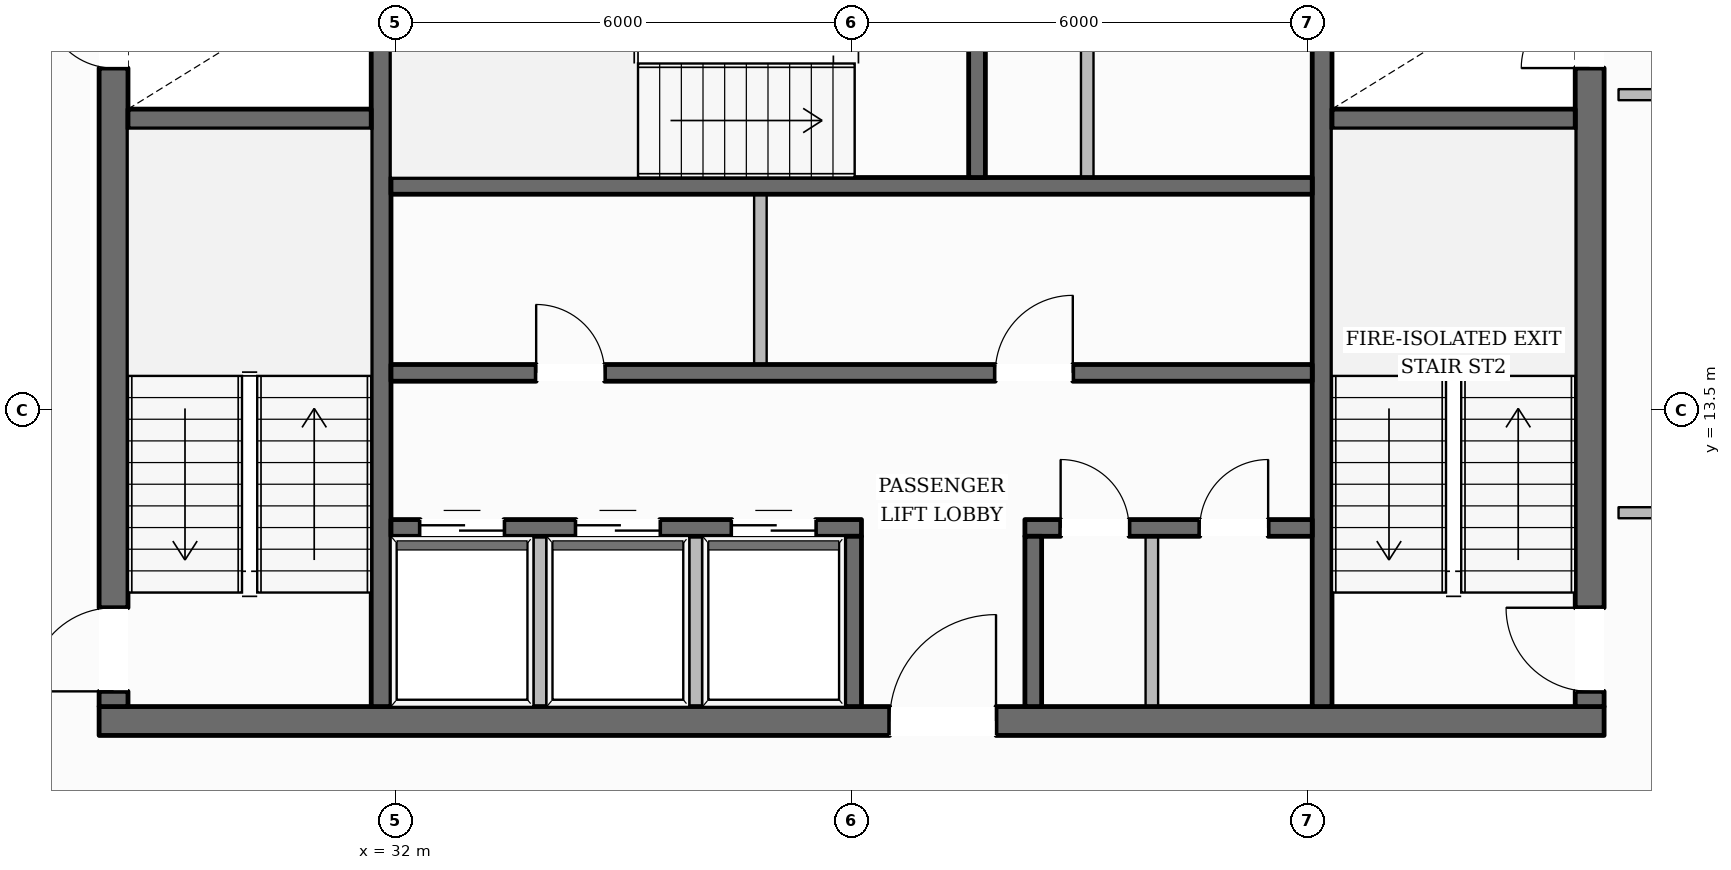
"""IFC4 building model, lengths in metres.
Left out: names, types, materials, properties, quantities, classifications, styles, units other than length and angle.
Written with IfcOpenShell. Run it as: python <this file> out.ifc"""

import sys

from ifc_helpers import new_model, si_unit, direction, frame, frame_2d, origin, place, context, subcontext, project, spatial, rectangle, extrude, element, fill, save


model = new_model("IFC4")
c1 = context("Model", 3, precision=1e-05, world=origin(), true_north=direction((0.0, 1.0)))
c2 = subcontext(c1, "Body", "Model", "MODEL_VIEW")
j1 = project(units=[si_unit("LENGTHUNIT", "METRE"), si_unit("PLANEANGLEUNIT", "RADIAN")], contexts=[c1])
p1 = place(None, origin())
s1 = spatial("IfcSite", under=j1, at=p1, CompositionType="ELEMENT")
p2 = place(p1, origin())
s2 = spatial("IfcBuilding", under=s1, at=p2, CompositionType="ELEMENT")
p3 = place(p2, frame((0.0, 0.0, 297.25)))
s3 = spatial("IfcBuildingStorey", under=s2, at=p3, CompositionType="ELEMENT", Elevation=297.25)
p4 = place(p3, frame((28.1, 9.41, 0.0), z_axis=(0.0, 0.0, 1.0), x_axis=(1.0, 0.0, 0.0)))
e1 = element("IfcWall", 1, at=p4, inside=s3, PredefinedType="SOLIDWALL", context=c2, shape_type="SweptSolid", body=[
    extrude(rectangle(XDim=19.8, YDim=0.38, at=frame_2d((9.9, 0.0))), origin(), (0.0, 0.0, 1.0), 3.61),
])
p5 = place(p4, frame((10.4, 0.0, 0.0)))
e2 = element("IfcOpeningElement", 2, at=p5, cuts=e1, PredefinedType="OPENING", context=c2, shape_type="SweptSolid", body=[
    extrude(rectangle(XDim=1.4, YDim=2.2, at=frame_2d((0.7, 1.1))), frame((0.0, 0.2, 0.0), z_axis=(0.0, -1.0, 0.0), x_axis=(1.0, 0.0, 0.0)), (0.0, 0.0, 1.0), 0.4),
])
p6 = place(p3, frame((28.29, 9.6, 0.0), z_axis=(0.0, 0.0, 1.0), x_axis=(0.0, 1.0, 0.0)))
e3 = element("IfcWall", 3, at=p6, inside=s3, PredefinedType="SOLIDWALL", context=c2, shape_type="SweptSolid", body=[
    extrude(rectangle(XDim=13.0, YDim=0.38, at=frame_2d((6.5, 0.0))), origin(), (0.0, 0.0, 1.0), 3.61),
])
p7 = place(p6, frame((0.2, 0.0, 0.0)))
e4 = element("IfcOpeningElement", 4, at=p7, cuts=e3, PredefinedType="OPENING", context=c2, shape_type="SweptSolid", body=[
    extrude(rectangle(XDim=1.1, YDim=2.15, at=frame_2d((0.55, 1.075))), frame((0.0, 0.2, 0.0), z_axis=(0.0, -1.0, 0.0), x_axis=(1.0, 0.0, 0.0)), (0.0, 0.0, 1.0), 0.4),
])
p8 = place(p6, frame((8.4, 0.0, 0.0)))
e5 = element("IfcOpeningElement", 5, at=p8, cuts=e3, PredefinedType="OPENING", context=c2, shape_type="SweptSolid", body=[
    extrude(rectangle(XDim=0.9, YDim=2.1, at=frame_2d((0.45, 1.05))), frame((0.0, 0.2, 0.0), z_axis=(0.0, -1.0, 0.0), x_axis=(1.0, 0.0, 0.0)), (0.0, 0.0, 1.0), 0.4),
])
p9 = place(p3, frame((47.71, 9.6, 0.0), z_axis=(0.0, 0.0, 1.0), x_axis=(0.0, 1.0, 0.0)))
e6 = element("IfcWall", 6, at=p9, inside=s3, PredefinedType="SOLIDWALL", context=c2, shape_type="SweptSolid", body=[
    extrude(rectangle(XDim=13.0, YDim=0.38, at=frame_2d((6.5, 0.0))), origin(), (0.0, 0.0, 1.0), 3.61),
])
p10 = place(p9, frame((0.2, 0.0, 0.0)))
e7 = element("IfcOpeningElement", 7, at=p10, cuts=e6, PredefinedType="OPENING", context=c2, shape_type="SweptSolid", body=[
    extrude(rectangle(XDim=1.1, YDim=2.15, at=frame_2d((0.55, 1.075))), frame((0.0, 0.2, 0.0), z_axis=(0.0, -1.0, 0.0), x_axis=(1.0, 0.0, 0.0)), (0.0, 0.0, 1.0), 0.4),
])
p11 = place(p9, frame((8.4, 0.0, 0.0)))
e8 = element("IfcOpeningElement", 8, at=p11, cuts=e6, PredefinedType="OPENING", context=c2, shape_type="SweptSolid", body=[
    extrude(rectangle(XDim=0.9, YDim=2.1, at=frame_2d((0.45, 1.05))), frame((0.0, 0.2, 0.0), z_axis=(0.0, -1.0, 0.0), x_axis=(1.0, 0.0, 0.0)), (0.0, 0.0, 1.0), 0.4),
])
p12 = place(p3, frame((31.81, 9.6, 0.0), z_axis=(0.0, 0.0, 1.0), x_axis=(0.0, 1.0, 0.0)))
e9 = element("IfcWall", 9, at=p12, inside=s3, PredefinedType="SHEAR", context=c2, shape_type="SweptSolid", body=[
    extrude(rectangle(XDim=13.0, YDim=0.26, at=frame_2d((6.5, 0.0))), origin(), (0.0, 0.0, 1.0), 3.61),
])
p13 = place(p12, frame((10.925, 0.0, 0.0)))
e10 = element("IfcOpeningElement", 10, at=p13, cuts=e9, PredefinedType="OPENING", context=c2, shape_type="SweptSolid", body=[
    extrude(rectangle(XDim=1.25, YDim=2.25, at=frame_2d((0.625, 1.125))), frame((0.0, 0.14, 0.0), z_axis=(0.0, -1.0, 0.0), x_axis=(1.0, 0.0, 0.0)), (0.0, 0.0, 1.0), 0.28),
])
p14 = place(p3, frame((44.19, 9.6, 0.0), z_axis=(0.0, 0.0, 1.0), x_axis=(0.0, 1.0, 0.0)))
e11 = element("IfcWall", 11, at=p14, inside=s3, PredefinedType="SHEAR", context=c2, shape_type="SweptSolid", body=[
    extrude(rectangle(XDim=13.0, YDim=0.26, at=frame_2d((6.5, 0.0))), origin(), (0.0, 0.0, 1.0), 3.61),
])
p15 = place(p14, frame((10.925, 0.0, 0.0)))
e12 = element("IfcOpeningElement", 12, at=p15, cuts=e11, PredefinedType="OPENING", context=c2, shape_type="SweptSolid", body=[
    extrude(rectangle(XDim=1.25, YDim=2.25, at=frame_2d((0.625, 1.125))), frame((0.0, 0.14, 0.0), z_axis=(0.0, -1.0, 0.0), x_axis=(1.0, 0.0, 0.0)), (0.0, 0.0, 1.0), 0.28),
])
for number, where, z_axis, x_axis in (
    (13, (28.48, 17.33, 0.0), (0.0, 0.0, 1.0), (1.0, 0.0, 0.0)),
    (14, (44.32, 17.33, 0.0), (0.0, 0.0, 1.0), (1.0, 0.0, 0.0)),
):
    element("IfcWall", number, at=place(p3, frame(where, z_axis=z_axis, x_axis=x_axis)), inside=s3, PredefinedType="SHEAR", context=c2, shape_type="SweptSolid", body=[
        extrude(rectangle(XDim=3.2, YDim=0.26, at=frame_2d((1.6, 0.0))), origin(), (0.0, 0.0, 1.0), 3.61),
    ])
p16 = place(p3, frame((31.94, 16.45, 0.0), z_axis=(0.0, 0.0, 1.0), x_axis=(1.0, 0.0, 0.0)))
e15 = element("IfcWall", 15, at=p16, inside=s3, PredefinedType="SOLIDWALL", context=c2, shape_type="SweptSolid", body=[
    extrude(rectangle(XDim=12.12, YDim=0.22, at=frame_2d((6.06, 0.0))), origin(), (0.0, 0.0, 1.0), 3.61),
])
p17 = place(p3, frame((39.65, 16.56, 0.0), z_axis=(0.0, 0.0, 1.0), x_axis=(0.0, 1.0, 0.0)))
e16 = element("IfcWall", 16, at=p17, inside=s3, PredefinedType="SOLIDWALL", context=c2, shape_type="SweptSolid", body=[
    extrude(rectangle(XDim=3.2, YDim=0.22, at=frame_2d((1.6, 0.0))), origin(), (0.0, 0.0, 1.0), 3.61),
])
p18 = place(p3, frame((31.94, 13.99, 0.0), z_axis=(0.0, 0.0, 1.0), x_axis=(1.0, 0.0, 0.0)))
e17 = element("IfcWall", 17, at=p18, inside=s3, PredefinedType="SOLIDWALL", context=c2, shape_type="SweptSolid", body=[
    extrude(rectangle(XDim=12.12, YDim=0.22, at=frame_2d((6.06, 0.0))), origin(), (0.0, 0.0, 1.0), 3.61),
])
p19 = place(p18, frame((1.91, 0.0, 0.0)))
e18 = element("IfcOpeningElement", 18, at=p19, cuts=e17, PredefinedType="OPENING", context=c2, shape_type="SweptSolid", body=[
    extrude(rectangle(XDim=0.9, YDim=2.1, at=frame_2d((0.45, 1.05))), frame((0.0, 0.12, 0.0), z_axis=(0.0, -1.0, 0.0), x_axis=(1.0, 0.0, 0.0)), (0.0, 0.0, 1.0), 0.24),
])
p20 = place(p18, frame((7.95, 0.0, 0.0)))
e19 = element("IfcOpeningElement", 19, at=p20, cuts=e17, PredefinedType="OPENING", context=c2, shape_type="SweptSolid", body=[
    extrude(rectangle(XDim=1.02, YDim=2.15, at=frame_2d((0.51, 1.075))), frame((0.0, 0.12, 0.0), z_axis=(0.0, -1.0, 0.0), x_axis=(1.0, 0.0, 0.0)), (0.0, 0.0, 1.0), 0.24),
])
p21 = place(p3, frame((31.94, 11.95, 0.0), z_axis=(0.0, 0.0, 1.0), x_axis=(1.0, 0.0, 0.0)))
e20 = element("IfcWall", 20, at=p21, inside=s3, PredefinedType="SOLIDWALL", context=c2, shape_type="SweptSolid", body=[
    extrude(rectangle(XDim=6.19, YDim=0.22, at=frame_2d((3.095, 0.0))), origin(), (0.0, 0.0, 1.0), 3.61),
])
p22 = place(p21, frame((0.385, 0.0, 0.0)))
e21 = element("IfcOpeningElement", 21, at=p22, cuts=e20, PredefinedType="OPENING", context=c2, shape_type="SweptSolid", body=[
    extrude(rectangle(XDim=1.1, YDim=2.2, at=frame_2d((0.55, 1.1))), frame((0.0, 0.12, 0.0), z_axis=(0.0, -1.0, 0.0), x_axis=(1.0, 0.0, 0.0)), (0.0, 0.0, 1.0), 0.24),
])
p23 = place(p21, frame((2.435, 0.0, 0.0)))
e22 = element("IfcOpeningElement", 22, at=p23, cuts=e20, PredefinedType="OPENING", context=c2, shape_type="SweptSolid", body=[
    extrude(rectangle(XDim=1.1, YDim=2.2, at=frame_2d((0.55, 1.1))), frame((0.0, 0.12, 0.0), z_axis=(0.0, -1.0, 0.0), x_axis=(1.0, 0.0, 0.0)), (0.0, 0.0, 1.0), 0.24),
])
p24 = place(p21, frame((4.485, 0.0, 0.0)))
e23 = element("IfcOpeningElement", 23, at=p24, cuts=e20, PredefinedType="OPENING", context=c2, shape_type="SweptSolid", body=[
    extrude(rectangle(XDim=1.1, YDim=2.2, at=frame_2d((0.55, 1.1))), frame((0.0, 0.12, 0.0), z_axis=(0.0, -1.0, 0.0), x_axis=(1.0, 0.0, 0.0)), (0.0, 0.0, 1.0), 0.24),
])
p25 = place(p3, frame((40.28, 11.95, 0.0), z_axis=(0.0, 0.0, 1.0), x_axis=(1.0, 0.0, 0.0)))
e24 = element("IfcWall", 24, at=p25, inside=s3, PredefinedType="SOLIDWALL", context=c2, shape_type="SweptSolid", body=[
    extrude(rectangle(XDim=3.78, YDim=0.22, at=frame_2d((1.89, 0.0))), origin(), (0.0, 0.0, 1.0), 3.61),
])
p26 = place(p25, frame((0.47, 0.0, 0.0)))
e25 = element("IfcOpeningElement", 25, at=p26, cuts=e24, PredefinedType="OPENING", context=c2, shape_type="SweptSolid", body=[
    extrude(rectangle(XDim=0.9, YDim=2.1, at=frame_2d((0.45, 1.05))), frame((0.0, 0.12, 0.0), z_axis=(0.0, -1.0, 0.0), x_axis=(1.0, 0.0, 0.0)), (0.0, 0.0, 1.0), 0.24),
])
p27 = place(p25, frame((2.3, 0.0, 0.0)))
e26 = element("IfcOpeningElement", 26, at=p27, cuts=e24, PredefinedType="OPENING", context=c2, shape_type="SweptSolid", body=[
    extrude(rectangle(XDim=0.9, YDim=2.1, at=frame_2d((0.45, 1.05))), frame((0.0, 0.12, 0.0), z_axis=(0.0, -1.0, 0.0), x_axis=(1.0, 0.0, 0.0)), (0.0, 0.0, 1.0), 0.24),
])
for number, where, z_axis, x_axis in (
    (27, (38.02, 9.6, 0.0), (0.0, 0.0, 1.0), (0.0, 1.0, 0.0)),
    (28, (40.39, 9.6, 0.0), (0.0, 0.0, 1.0), (0.0, 1.0, 0.0)),
):
    element("IfcWall", number, at=place(p3, frame(where, z_axis=z_axis, x_axis=x_axis)), inside=s3, PredefinedType="SOLIDWALL", context=c2, shape_type="SweptSolid", body=[
        extrude(rectangle(XDim=2.24, YDim=0.22, at=frame_2d((1.12, 0.0))), origin(), (0.0, 0.0, 1.0), 3.61),
    ])
p28 = place(p3, frame((15.563, 10.112, 0.0), z_axis=(0.0, 0.0, 1.0), x_axis=(0.4973006053, 0.867578300771, 0.0)))
e29 = element("IfcWall", 29, at=p28, inside=s3, PredefinedType="STANDARD", context=c2, shape_type="SweptSolid", body=[
    extrude(rectangle(XDim=39.842, YDim=0.35, at=frame_2d((19.921, 0.0))), origin(), (0.0, 0.0, 1.0), 3.196),
])
p29 = place(p28, frame((35.45, 0.0, 0.65)))
e30 = element("IfcOpeningElement", 30, at=p29, cuts=e29, PredefinedType="OPENING", context=c2, shape_type="SweptSolid", body=[
    extrude(rectangle(XDim=1.35, YDim=1.75, at=frame_2d((0.675, 0.875))), frame((0.0, 0.185, 0.0), z_axis=(0.0, -1.0, 0.0), x_axis=(1.0, 0.0, 0.0)), (0.0, 0.0, 1.0), 0.37),
])
p30 = place(p28, frame((28.968, 0.0, 0.65)))
e31 = element("IfcOpeningElement", 31, at=p30, cuts=e29, PredefinedType="OPENING", context=c2, shape_type="SweptSolid", body=[
    extrude(rectangle(XDim=1.35, YDim=1.75, at=frame_2d((0.675, 0.875))), frame((0.0, 0.185, 0.0), z_axis=(0.0, -1.0, 0.0), x_axis=(1.0, 0.0, 0.0)), (0.0, 0.0, 1.0), 0.37),
])
p31 = place(p28, frame((16.003, 0.0, 0.65)))
e32 = element("IfcOpeningElement", 32, at=p31, cuts=e29, PredefinedType="OPENING", context=c2, shape_type="SweptSolid", body=[
    extrude(rectangle(XDim=1.35, YDim=1.75, at=frame_2d((0.675, 0.875))), frame((0.0, 0.185, 0.0), z_axis=(0.0, -1.0, 0.0), x_axis=(1.0, 0.0, 0.0)), (0.0, 0.0, 1.0), 0.37),
])
p32 = place(p28, frame((9.521, 0.0, 0.65)))
e33 = element("IfcOpeningElement", 33, at=p32, cuts=e29, PredefinedType="OPENING", context=c2, shape_type="SweptSolid", body=[
    extrude(rectangle(XDim=1.35, YDim=1.75, at=frame_2d((0.675, 0.875))), frame((0.0, 0.185, 0.0), z_axis=(0.0, -1.0, 0.0), x_axis=(1.0, 0.0, 0.0)), (0.0, 0.0, 1.0), 0.37),
])
p33 = place(p28, frame((3.039, 0.0, 0.65)))
e34 = element("IfcOpeningElement", 34, at=p33, cuts=e29, PredefinedType="OPENING", context=c2, shape_type="SweptSolid", body=[
    extrude(rectangle(XDim=1.35, YDim=1.75, at=frame_2d((0.675, 0.875))), frame((0.0, 0.185, 0.0), z_axis=(0.0, -1.0, 0.0), x_axis=(1.0, 0.0, 0.0)), (0.0, 0.0, 1.0), 0.37),
])
p34 = place(p3, frame((40.538, 44.729, 0.0), z_axis=(0.0, 0.0, 1.0), x_axis=(0.48974037202, -0.871868320341, 0.0)))
e35 = element("IfcWall", 35, at=p34, inside=s3, PredefinedType="STANDARD", context=c2, shape_type="SweptSolid", body=[
    extrude(rectangle(XDim=39.262, YDim=0.35, at=frame_2d((19.631, 0.0))), origin(), (0.0, 0.0, 1.0), 3.196),
])
p35 = place(p34, frame((34.923, 0.0, 0.65)))
e36 = element("IfcOpeningElement", 36, at=p35, cuts=e35, PredefinedType="OPENING", context=c2, shape_type="SweptSolid", body=[
    extrude(rectangle(XDim=1.35, YDim=1.75, at=frame_2d((0.675, 0.875))), frame((0.0, 0.185, 0.0), z_axis=(0.0, -1.0, 0.0), x_axis=(1.0, 0.0, 0.0)), (0.0, 0.0, 1.0), 0.37),
])
p36 = place(p34, frame((28.538, 0.0, 0.65)))
e37 = element("IfcOpeningElement", 37, at=p36, cuts=e35, PredefinedType="OPENING", context=c2, shape_type="SweptSolid", body=[
    extrude(rectangle(XDim=1.35, YDim=1.75, at=frame_2d((0.675, 0.875))), frame((0.0, 0.185, 0.0), z_axis=(0.0, -1.0, 0.0), x_axis=(1.0, 0.0, 0.0)), (0.0, 0.0, 1.0), 0.37),
])
p37 = place(p34, frame((15.77, 0.0, 0.65)))
e38 = element("IfcOpeningElement", 38, at=p37, cuts=e35, PredefinedType="OPENING", context=c2, shape_type="SweptSolid", body=[
    extrude(rectangle(XDim=1.35, YDim=1.75, at=frame_2d((0.675, 0.875))), frame((0.0, 0.185, 0.0), z_axis=(0.0, -1.0, 0.0), x_axis=(1.0, 0.0, 0.0)), (0.0, 0.0, 1.0), 0.37),
])
p38 = place(p34, frame((9.385, 0.0, 0.65)))
e39 = element("IfcOpeningElement", 39, at=p38, cuts=e35, PredefinedType="OPENING", context=c2, shape_type="SweptSolid", body=[
    extrude(rectangle(XDim=1.35, YDim=1.75, at=frame_2d((0.675, 0.875))), frame((0.0, 0.185, 0.0), z_axis=(0.0, -1.0, 0.0), x_axis=(1.0, 0.0, 0.0)), (0.0, 0.0, 1.0), 0.37),
])
p39 = place(p34, frame((3.001, 0.0, 0.65)))
e40 = element("IfcOpeningElement", 40, at=p39, cuts=e35, PredefinedType="OPENING", context=c2, shape_type="SweptSolid", body=[
    extrude(rectangle(XDim=1.35, YDim=1.75, at=frame_2d((0.675, 0.875))), frame((0.0, 0.185, 0.0), z_axis=(0.0, -1.0, 0.0), x_axis=(1.0, 0.0, 0.0)), (0.0, 0.0, 1.0), 0.37),
])
for number, where, z_axis, x_axis in (
    (41, (33.9, 9.49, 0.0), (0.0, 0.0, 1.0), (0.0, 1.0, 0.0)),
    (42, (35.95, 9.49, 0.0), (0.0, 0.0, 1.0), (0.0, 1.0, 0.0)),
):
    element("IfcWall", number, at=place(p3, frame(where, z_axis=z_axis, x_axis=x_axis)), inside=s3, PredefinedType="PARTITIONING", context=c2, shape_type="SweptSolid", body=[
        extrude(rectangle(XDim=2.35, YDim=0.165, at=frame_2d((1.175, 0.0))), origin(), (0.0, 0.0, 1.0), 3.61),
    ])
p40 = place(p3, frame((36.8, 14.1, 0.0), z_axis=(0.0, 0.0, 1.0), x_axis=(0.0, 1.0, 0.0)))
e43 = element("IfcWall", 43, at=p40, inside=s3, PredefinedType="PARTITIONING", context=c2, shape_type="SweptSolid", body=[
    extrude(rectangle(XDim=2.24, YDim=0.165, at=frame_2d((1.12, 0.0))), origin(), (0.0, 0.0, 1.0), 3.61),
])
p41 = place(p3, frame((41.1, 16.56, 0.0), z_axis=(0.0, 0.0, 1.0), x_axis=(0.0, 1.0, 0.0)))
e44 = element("IfcWall", 44, at=p41, inside=s3, PredefinedType="PARTITIONING", context=c2, shape_type="SweptSolid", body=[
    extrude(rectangle(XDim=3.2, YDim=0.165, at=frame_2d((1.6, 0.0))), origin(), (0.0, 0.0, 1.0), 3.61),
])
p42 = place(p3, frame((41.95, 9.49, 0.0), z_axis=(0.0, 0.0, 1.0), x_axis=(0.0, 1.0, 0.0)))
e45 = element("IfcWall", 45, at=p42, inside=s3, PredefinedType="PARTITIONING", context=c2, shape_type="SweptSolid", body=[
    extrude(rectangle(XDim=2.35, YDim=0.165, at=frame_2d((1.175, 0.0))), origin(), (0.0, 0.0, 1.0), 3.61),
])
for number, where, z_axis, x_axis in (
    (46, (49.91, 17.65, 0.0), (0.0, 0.0, 1.0), (-1.0, 0.0, 0.0)),
    (47, (48.09, 12.15, 0.0), (0.0, 0.0, 1.0), (1.0, 0.0, 0.0)),
):
    element("IfcWall", number, at=place(p3, frame(where, z_axis=z_axis, x_axis=x_axis)), inside=s3, PredefinedType="PARTITIONING", context=c2, shape_type="SweptSolid", body=[
        extrude(rectangle(XDim=1.82, YDim=0.145, at=frame_2d((0.91, 0.0))), origin(), (0.0, 0.0, 1.0), 3.61),
    ])
p43 = place(p7, origin())
e48 = element("IfcDoor", 48, at=p43, inside=s3, OperationType="SINGLE_SWING_LEFT", PredefinedType="DOOR", context=c2, shape_type="SweptSolid", body=[
    extrude(rectangle(XDim=1.1, YDim=2.15, at=frame_2d((0.55, 1.075))), frame((0.0, 0.025, 0.0), z_axis=(0.0, -1.0, 0.0), x_axis=(1.0, 0.0, 0.0)), (0.0, 0.0, 1.0), 0.05),
])
fill(e4, e48)
p44 = place(p10, origin())
e49 = element("IfcDoor", 49, at=p44, inside=s3, OperationType="SINGLE_SWING_RIGHT", PredefinedType="DOOR", context=c2, shape_type="SweptSolid", body=[
    extrude(rectangle(XDim=1.1, YDim=2.15, at=frame_2d((0.55, 1.075))), frame((0.0, 0.025, 0.0), z_axis=(0.0, -1.0, 0.0), x_axis=(1.0, 0.0, 0.0)), (0.0, 0.0, 1.0), 0.05),
])
fill(e7, e49)
p45 = place(p8, origin())
e50 = element("IfcDoor", 50, at=p45, inside=s3, OperationType="SINGLE_SWING_RIGHT", PredefinedType="DOOR", context=c2, shape_type="SweptSolid", body=[
    extrude(rectangle(XDim=0.9, YDim=2.1, at=frame_2d((0.45, 1.05))), frame((0.0, 0.025, 0.0), z_axis=(0.0, -1.0, 0.0), x_axis=(1.0, 0.0, 0.0)), (0.0, 0.0, 1.0), 0.05),
])
fill(e5, e50)
p46 = place(p11, origin())
e51 = element("IfcDoor", 51, at=p46, inside=s3, OperationType="SINGLE_SWING_LEFT", PredefinedType="DOOR", context=c2, shape_type="SweptSolid", body=[
    extrude(rectangle(XDim=0.9, YDim=2.1, at=frame_2d((0.45, 1.05))), frame((0.0, 0.025, 0.0), z_axis=(0.0, -1.0, 0.0), x_axis=(1.0, 0.0, 0.0)), (0.0, 0.0, 1.0), 0.05),
])
fill(e8, e51)
p47 = place(p5, origin())
e52 = element("IfcDoor", 52, at=p47, inside=s3, OperationType="SINGLE_SWING_RIGHT", PredefinedType="DOOR", context=c2, shape_type="SweptSolid", body=[
    extrude(rectangle(XDim=1.4, YDim=2.2, at=frame_2d((0.7, 1.1))), frame((0.0, 0.025, 0.0), z_axis=(0.0, -1.0, 0.0), x_axis=(1.0, 0.0, 0.0)), (0.0, 0.0, 1.0), 0.05),
])
fill(e2, e52)
p48 = place(p22, origin())
e53 = element("IfcDoor", 53, at=p48, inside=s3, OperationType="DOUBLE_DOOR_SLIDING", PredefinedType="DOOR", context=c2, shape_type="SweptSolid", body=[
    extrude(rectangle(XDim=1.1, YDim=2.2, at=frame_2d((0.55, 1.1))), frame((0.0, 0.025, 0.0), z_axis=(0.0, -1.0, 0.0), x_axis=(1.0, 0.0, 0.0)), (0.0, 0.0, 1.0), 0.05),
])
fill(e21, e53)
p49 = place(p23, origin())
e54 = element("IfcDoor", 54, at=p49, inside=s3, OperationType="DOUBLE_DOOR_SLIDING", PredefinedType="DOOR", context=c2, shape_type="SweptSolid", body=[
    extrude(rectangle(XDim=1.1, YDim=2.2, at=frame_2d((0.55, 1.1))), frame((0.0, 0.025, 0.0), z_axis=(0.0, -1.0, 0.0), x_axis=(1.0, 0.0, 0.0)), (0.0, 0.0, 1.0), 0.05),
])
fill(e22, e54)
p50 = place(p24, origin())
e55 = element("IfcDoor", 55, at=p50, inside=s3, OperationType="DOUBLE_DOOR_SLIDING", PredefinedType="DOOR", context=c2, shape_type="SweptSolid", body=[
    extrude(rectangle(XDim=1.1, YDim=2.2, at=frame_2d((0.55, 1.1))), frame((0.0, 0.025, 0.0), z_axis=(0.0, -1.0, 0.0), x_axis=(1.0, 0.0, 0.0)), (0.0, 0.0, 1.0), 0.05),
])
fill(e23, e55)
p51 = place(p19, origin())
e56 = element("IfcDoor", 56, at=p51, inside=s3, OperationType="SINGLE_SWING_LEFT", PredefinedType="DOOR", context=c2, shape_type="SweptSolid", body=[
    extrude(rectangle(XDim=0.9, YDim=2.1, at=frame_2d((0.45, 1.05))), frame((0.0, 0.025, 0.0), z_axis=(0.0, -1.0, 0.0), x_axis=(1.0, 0.0, 0.0)), (0.0, 0.0, 1.0), 0.05),
])
fill(e18, e56)
p52 = place(p20, origin())
e57 = element("IfcDoor", 57, at=p52, inside=s3, OperationType="SINGLE_SWING_RIGHT", PredefinedType="DOOR", context=c2, shape_type="SweptSolid", body=[
    extrude(rectangle(XDim=1.02, YDim=2.15, at=frame_2d((0.51, 1.075))), frame((0.0, 0.025, 0.0), z_axis=(0.0, -1.0, 0.0), x_axis=(1.0, 0.0, 0.0)), (0.0, 0.0, 1.0), 0.05),
])
fill(e19, e57)
p53 = place(p26, origin())
e58 = element("IfcDoor", 58, at=p53, inside=s3, OperationType="SINGLE_SWING_LEFT", PredefinedType="DOOR", context=c2, shape_type="SweptSolid", body=[
    extrude(rectangle(XDim=0.9, YDim=2.1, at=frame_2d((0.45, 1.05))), frame((0.0, 0.025, 0.0), z_axis=(0.0, -1.0, 0.0), x_axis=(1.0, 0.0, 0.0)), (0.0, 0.0, 1.0), 0.05),
])
fill(e25, e58)
p54 = place(p27, origin())
e59 = element("IfcDoor", 59, at=p54, inside=s3, OperationType="SINGLE_SWING_RIGHT", PredefinedType="DOOR", context=c2, shape_type="SweptSolid", body=[
    extrude(rectangle(XDim=0.9, YDim=2.1, at=frame_2d((0.45, 1.05))), frame((0.0, 0.025, 0.0), z_axis=(0.0, -1.0, 0.0), x_axis=(1.0, 0.0, 0.0)), (0.0, 0.0, 1.0), 0.05),
])
fill(e26, e59)
save(model, sys.argv[1])
